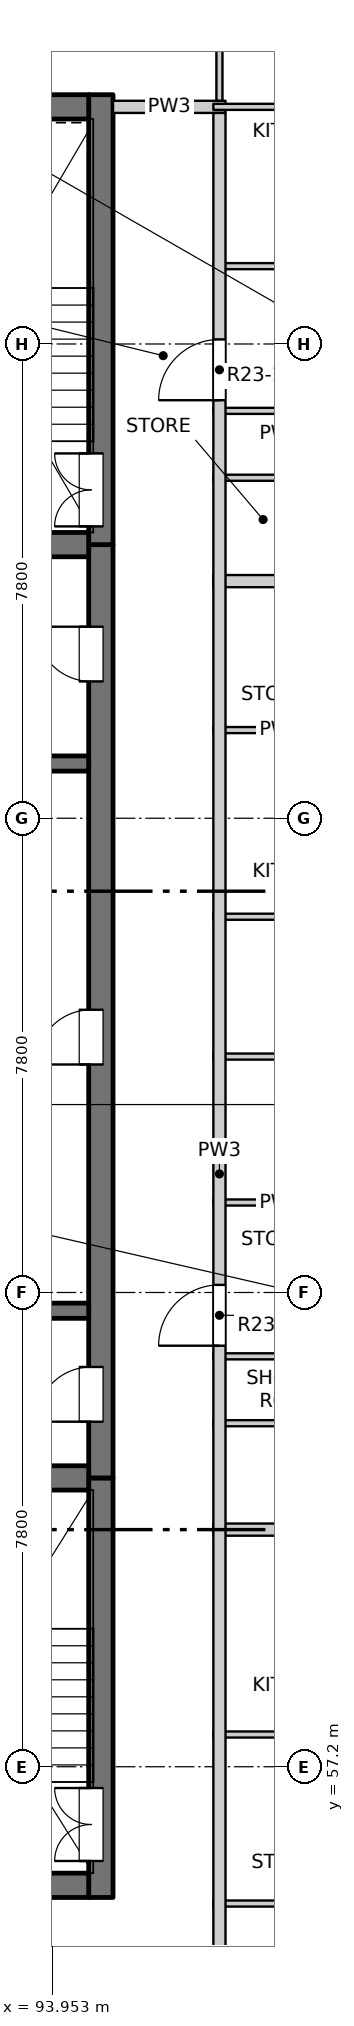
"""IFC4 building model, lengths in metres.
Left out: names, types, materials, properties, quantities, classifications, styles, units other than length and angle.
Written with IfcOpenShell. Run it as: python <this file> out.ifc"""

import sys

from ifc_helpers import new_model, si_unit, direction, frame, frame_2d, origin, place, context, subcontext, project, spatial, rectangle, extrude, element, fill, save


model = new_model("IFC4")
c1 = context("Model", 3, precision=1e-05, world=origin(), true_north=direction((0.0, 1.0)))
c2 = subcontext(c1, "Body", "Model", "MODEL_VIEW")
j1 = project(units=[si_unit("LENGTHUNIT", "METRE"), si_unit("PLANEANGLEUNIT", "RADIAN")], contexts=[c1])
p1 = place(None, origin())
s1 = spatial("IfcSite", under=j1, at=p1, CompositionType="ELEMENT")
p2 = place(p1, origin())
s2 = spatial("IfcBuilding", under=s1, at=p2, CompositionType="ELEMENT")
p3 = place(p2, frame((0.0, 0.0, 238.1)))
s3 = spatial("IfcBuildingStorey", under=s2, at=p3, CompositionType="ELEMENT", Elevation=238.1)
p4 = place(p3, frame((94.75, 55.05, -0.25), z_axis=(0.0, 0.0, 1.0), x_axis=(0.0, 1.0, 0.0)))
e1 = element("IfcWall", 1, at=p4, inside=s3, PredefinedType="SOLIDWALL", context=c2, shape_type="SweptSolid", body=[
    extrude(rectangle(XDim=6.9, YDim=0.4, at=frame_2d((3.45, 0.0))), origin(), (0.0, 0.0, 1.0), 3.35),
])
p5 = place(p4, frame((0.6, 0.0, 0.25)))
e2 = element("IfcOpeningElement", 2, at=p5, cuts=e1, PredefinedType="OPENING", context=c2, shape_type="SweptSolid", body=[
    extrude(rectangle(XDim=1.2, YDim=2.1, at=frame_2d((0.6, 1.05))), frame((0.0, 0.21, 0.0), z_axis=(0.0, -1.0, 0.0), x_axis=(1.0, 0.0, 0.0)), (0.0, 0.0, 1.0), 0.42),
])
p6 = place(p3, frame((94.75, 61.95, -0.25), z_axis=(0.0, 0.0, 1.0), x_axis=(0.0, 1.0, 0.0)))
e3 = element("IfcWall", 3, at=p6, inside=s3, PredefinedType="SOLIDWALL", context=c2, shape_type="SweptSolid", body=[
    extrude(rectangle(XDim=15.35, YDim=0.4, at=frame_2d((7.675, 0.0))), origin(), (0.0, 0.0, 1.0), 3.35),
])
p7 = place(p6, frame((0.925, 0.0, 0.25)))
e4 = element("IfcOpeningElement", 4, at=p7, cuts=e3, PredefinedType="OPENING", context=c2, shape_type="SweptSolid", body=[
    extrude(rectangle(XDim=0.9, YDim=2.1, at=frame_2d((0.45, 1.05))), frame((0.0, 0.21, 0.0), z_axis=(0.0, -1.0, 0.0), x_axis=(1.0, 0.0, 0.0)), (0.0, 0.0, 1.0), 0.42),
])
p8 = place(p6, frame((6.8, 0.0, 0.25)))
e5 = element("IfcOpeningElement", 5, at=p8, cuts=e3, PredefinedType="OPENING", context=c2, shape_type="SweptSolid", body=[
    extrude(rectangle(XDim=0.9, YDim=2.1, at=frame_2d((0.45, 1.05))), frame((0.0, 0.21, 0.0), z_axis=(0.0, -1.0, 0.0), x_axis=(1.0, 0.0, 0.0)), (0.0, 0.0, 1.0), 0.42),
])
p9 = place(p6, frame((13.1, 0.0, 0.25)))
e6 = element("IfcOpeningElement", 6, at=p9, cuts=e3, PredefinedType="OPENING", context=c2, shape_type="SweptSolid", body=[
    extrude(rectangle(XDim=0.9, YDim=2.1, at=frame_2d((0.45, 1.05))), frame((0.0, 0.21, 0.0), z_axis=(0.0, -1.0, 0.0), x_axis=(1.0, 0.0, 0.0)), (0.0, 0.0, 1.0), 0.42),
])
p10 = place(p3, frame((94.75, 77.3, -0.25), z_axis=(0.0, 0.0, 1.0), x_axis=(0.0, 1.0, 0.0)))
e7 = element("IfcWall", 7, at=p10, inside=s3, PredefinedType="SOLIDWALL", context=c2, shape_type="SweptSolid", body=[
    extrude(rectangle(XDim=7.4, YDim=0.4, at=frame_2d((3.7, 0.0))), origin(), (0.0, 0.0, 1.0), 3.35),
])
p11 = place(p10, frame((0.3, 0.0, 0.25)))
e8 = element("IfcOpeningElement", 8, at=p11, cuts=e7, PredefinedType="OPENING", context=c2, shape_type="SweptSolid", body=[
    extrude(rectangle(XDim=1.2, YDim=2.1, at=frame_2d((0.6, 1.05))), frame((0.0, 0.21, 0.0), z_axis=(0.0, -1.0, 0.0), x_axis=(1.0, 0.0, 0.0)), (0.0, 0.0, 1.0), 0.42),
])
p12 = place(p3, frame((75.45, 55.25, -0.25), z_axis=(0.0, 0.0, 1.0), x_axis=(1.0, 0.0, 0.0)))
e9 = element("IfcWall", 9, at=p12, inside=s3, PredefinedType="SOLIDWALL", context=c2, shape_type="SweptSolid", body=[
    extrude(rectangle(XDim=19.1, YDim=0.4, at=frame_2d((9.55, 0.0))), origin(), (0.0, 0.0, 1.0), 3.35),
])
p13 = place(p12, frame((8.8, 0.0, 0.25)))
e10 = element("IfcOpeningElement", 10, at=p13, cuts=e9, PredefinedType="OPENING", context=c2, shape_type="SweptSolid", body=[
    extrude(rectangle(XDim=1.5, YDim=2.1, at=frame_2d((0.75, 1.05))), frame((0.0, 0.21, 0.0), z_axis=(0.0, -1.0, 0.0), x_axis=(1.0, 0.0, 0.0)), (0.0, 0.0, 1.0), 0.42),
])
p14 = place(p3, frame((75.45, 84.5, -0.25), z_axis=(0.0, 0.0, 1.0), x_axis=(1.0, 0.0, 0.0)))
e11 = element("IfcWall", 11, at=p14, inside=s3, PredefinedType="SOLIDWALL", context=c2, shape_type="SweptSolid", body=[
    extrude(rectangle(XDim=19.1, YDim=0.4, at=frame_2d((9.55, 0.0))), origin(), (0.0, 0.0, 1.0), 3.35),
])
p15 = place(p3, frame((90.675, 61.95, -0.25), z_axis=(0.0, 0.0, 1.0), x_axis=(1.0, 0.0, 0.0)))
e12 = element("IfcWall", 12, at=p15, inside=s3, PredefinedType="SOLIDWALL", context=c2, shape_type="SweptSolid", body=[
    extrude(rectangle(XDim=3.875, YDim=0.4, at=frame_2d((1.938, 0.0))), origin(), (0.0, 0.0, 1.0), 3.35),
])
for number, where, z_axis, x_axis in (
    (13, (90.675, 64.7, -0.25), (0.0, 0.0, 1.0), (1.0, 0.0, 0.0)),
    (14, (90.675, 73.7, -0.25), (0.0, 0.0, 1.0), (1.0, 0.0, 0.0)),
):
    element("IfcWall", number, at=place(p3, frame(where, z_axis=z_axis, x_axis=x_axis)), inside=s3, PredefinedType="SOLIDWALL", context=c2, shape_type="SweptSolid", body=[
        extrude(rectangle(XDim=3.875, YDim=0.25, at=frame_2d((1.938, 0.0))), origin(), (0.0, 0.0, 1.0), 3.35),
    ])
p16 = place(p3, frame((90.675, 77.3, -0.25), z_axis=(0.0, 0.0, 1.0), x_axis=(1.0, 0.0, 0.0)))
e15 = element("IfcWall", 15, at=p16, inside=s3, PredefinedType="SOLIDWALL", context=c2, shape_type="SweptSolid", body=[
    extrude(rectangle(XDim=3.875, YDim=0.4, at=frame_2d((1.938, 0.0))), origin(), (0.0, 0.0, 1.0), 3.35),
])
for number, where, z_axis, x_axis in (
    (16, (96.6, 54.95, 0.0), (0.0, 0.0, 1.0), (1.0, 0.0, 0.0)),
    (17, (96.6, 57.73, 0.0), (0.0, 0.0, 1.0), (1.0, 0.0, 0.0)),
):
    element("IfcWall", number, at=place(p3, frame(where, z_axis=z_axis, x_axis=x_axis)), inside=s3, PredefinedType="PARTITIONING", context=c2, shape_type="SweptSolid", body=[
        extrude(rectangle(XDim=2.22, YDim=0.1, at=frame_2d((1.11, 0.0))), origin(), (0.0, 0.0, 1.0), 3.1),
    ])
p17 = place(p3, frame((96.6, 61.1, 0.0), z_axis=(0.0, 0.0, 1.0), x_axis=(1.0, 0.0, 0.0)))
e18 = element("IfcWall", 18, at=p17, inside=s3, PredefinedType="PARTITIONING", context=c2, shape_type="SweptSolid", body=[
    extrude(rectangle(XDim=11.5, YDim=0.2, at=frame_2d((5.75, 0.0))), origin(), (0.0, 0.0, 1.0), 3.1),
])
for number, where, z_axis, x_axis in (
    (19, (96.6, 62.85, 0.0), (0.0, 0.0, 1.0), (1.0, 0.0, 0.0)),
    (20, (96.6, 63.95, 0.0), (0.0, 0.0, 1.0), (1.0, 0.0, 0.0)),
    (21, (96.6, 66.48, 0.0), (0.0, 0.0, 1.0), (1.0, 0.0, 0.0)),
    (22, (96.6, 68.88, 0.0), (0.0, 0.0, 1.0), (1.0, 0.0, 0.0)),
    (23, (96.6, 71.18, 0.0), (0.0, 0.0, 1.0), (1.0, 0.0, 0.0)),
    (24, (96.6, 74.25, 0.0), (0.0, 0.0, 1.0), (1.0, 0.0, 0.0)),
):
    element("IfcWall", number, at=place(p3, frame(where, z_axis=z_axis, x_axis=x_axis)), inside=s3, PredefinedType="PARTITIONING", context=c2, shape_type="SweptSolid", body=[
        extrude(rectangle(XDim=2.22, YDim=0.1, at=frame_2d((1.11, 0.0))), origin(), (0.0, 0.0, 1.0), 3.1),
    ])
p18 = place(p3, frame((96.6, 76.7, 0.0), z_axis=(0.0, 0.0, 1.0), x_axis=(1.0, 0.0, 0.0)))
e25 = element("IfcWall", 25, at=p18, inside=s3, PredefinedType="PARTITIONING", context=c2, shape_type="SweptSolid", body=[
    extrude(rectangle(XDim=11.5, YDim=0.2, at=frame_2d((5.75, 0.0))), origin(), (0.0, 0.0, 1.0), 3.1),
])
for number, where, z_axis, x_axis in (
    (26, (96.6, 78.4, 0.0), (0.0, 0.0, 1.0), (1.0, 0.0, 0.0)),
    (27, (96.6, 79.5, 0.0), (0.0, 0.0, 1.0), (1.0, 0.0, 0.0)),
    (28, (96.6, 81.88, 0.0), (0.0, 0.0, 1.0), (1.0, 0.0, 0.0)),
):
    element("IfcWall", number, at=place(p3, frame(where, z_axis=z_axis, x_axis=x_axis)), inside=s3, PredefinedType="PARTITIONING", context=c2, shape_type="SweptSolid", body=[
        extrude(rectangle(XDim=2.22, YDim=0.1, at=frame_2d((1.11, 0.0))), origin(), (0.0, 0.0, 1.0), 3.1),
    ])
p19 = place(p3, frame((94.95, 84.5, 0.0), z_axis=(0.0, 0.0, 1.0), x_axis=(1.0, 0.0, 0.0)))
e29 = element("IfcWall", 29, at=p19, inside=s3, PredefinedType="PARTITIONING", context=c2, shape_type="SweptSolid", body=[
    extrude(rectangle(XDim=1.85, YDim=0.2, at=frame_2d((0.925, 0.0))), origin(), (0.0, 0.0, 1.0), 3.1),
])
p20 = place(p3, frame((96.6, 84.5, 0.0), z_axis=(0.0, 0.0, 1.0), x_axis=(1.0, 0.0, 0.0)))
e30 = element("IfcWall", 30, at=p20, inside=s3, PredefinedType="PARTITIONING", context=c2, shape_type="SweptSolid", body=[
    extrude(rectangle(XDim=11.5, YDim=0.1, at=frame_2d((5.75, 0.0))), origin(), (0.0, 0.0, 1.0), 3.1),
])
p21 = place(p20, frame((2.635, 0.0, 0.0)))
e31 = element("IfcOpeningElement", 31, at=p21, cuts=e30, PredefinedType="OPENING", context=c2, shape_type="SweptSolid", body=[
    extrude(rectangle(XDim=0.9, YDim=2.1, at=frame_2d((0.45, 1.05))), frame((0.0, 0.06, 0.0), z_axis=(0.0, -1.0, 0.0), x_axis=(1.0, 0.0, 0.0)), (0.0, 0.0, 1.0), 0.12),
])
p22 = place(p3, frame((96.7, 49.5, 0.0), z_axis=(0.0, 0.0, 1.0), x_axis=(0.0, 1.0, 0.0)))
e32 = element("IfcWall", 32, at=p22, inside=s3, PredefinedType="PARTITIONING", context=c2, shape_type="SweptSolid", body=[
    extrude(rectangle(XDim=34.9, YDim=0.2, at=frame_2d((17.45, 0.0))), origin(), (0.0, 0.0, 1.0), 3.1),
])
p23 = place(p22, frame((3.175, 0.0, 0.0)))
e33 = element("IfcOpeningElement", 33, at=p23, cuts=e32, PredefinedType="OPENING", context=c2, shape_type="SweptSolid", body=[
    extrude(rectangle(XDim=1.0, YDim=2.1, at=frame_2d((0.5, 1.05))), frame((0.0, 0.11, 0.0), z_axis=(0.0, -1.0, 0.0), x_axis=(1.0, 0.0, 0.0)), (0.0, 0.0, 1.0), 0.22),
])
p24 = place(p22, frame((14.625, 0.0, 0.0)))
e34 = element("IfcOpeningElement", 34, at=p24, cuts=e32, PredefinedType="OPENING", context=c2, shape_type="SweptSolid", body=[
    extrude(rectangle(XDim=1.0, YDim=2.1, at=frame_2d((0.5, 1.05))), frame((0.0, 0.11, 0.0), z_axis=(0.0, -1.0, 0.0), x_axis=(1.0, 0.0, 0.0)), (0.0, 0.0, 1.0), 0.22),
])
p25 = place(p22, frame((30.175, 0.0, 0.0)))
e35 = element("IfcOpeningElement", 35, at=p25, cuts=e32, PredefinedType="OPENING", context=c2, shape_type="SweptSolid", body=[
    extrude(rectangle(XDim=1.0, YDim=2.1, at=frame_2d((0.5, 1.05))), frame((0.0, 0.11, 0.0), z_axis=(0.0, -1.0, 0.0), x_axis=(1.0, 0.0, 0.0)), (0.0, 0.0, 1.0), 0.22),
])
p26 = place(p3, frame((96.7, 84.6, 0.0), z_axis=(0.0, 0.0, 1.0), x_axis=(0.0, 1.0, 0.0)))
e36 = element("IfcWall", 36, at=p26, inside=s3, PredefinedType="PARTITIONING", context=c2, shape_type="SweptSolid", body=[
    extrude(rectangle(XDim=3.5, YDim=0.1, at=frame_2d((1.75, 0.0))), origin(), (0.0, 0.0, 1.0), 3.1),
])
p27 = place(p26, frame((1.4, 0.0, 0.0)))
e37 = element("IfcOpeningElement", 37, at=p27, cuts=e36, PredefinedType="OPENING", context=c2, shape_type="SweptSolid", body=[
    extrude(rectangle(XDim=0.9, YDim=2.1, at=frame_2d((0.45, 1.05))), frame((0.0, 0.06, 0.0), z_axis=(0.0, -1.0, 0.0), x_axis=(1.0, 0.0, 0.0)), (0.0, 0.0, 1.0), 0.12),
])
p28 = place(p5, origin())
e38 = element("IfcDoor", 38, at=p28, inside=s3, OperationType="DOUBLE_DOOR_SINGLE_SWING", PredefinedType="DOOR", context=c2, shape_type="SweptSolid", body=[
    extrude(rectangle(XDim=1.2, YDim=2.1, at=frame_2d((0.6, 1.05))), frame((0.0, 0.185, 0.0), z_axis=(0.0, -1.0, 0.0), x_axis=(1.0, 0.0, 0.0)), (0.0, 0.0, 1.0), 0.05),
])
fill(e2, e38)
p29 = place(p7, origin())
e39 = element("IfcDoor", 39, at=p29, inside=s3, OperationType="SINGLE_SWING_LEFT", PredefinedType="DOOR", context=c2, shape_type="SweptSolid", body=[
    extrude(rectangle(XDim=0.9, YDim=2.1, at=frame_2d((0.45, 1.05))), frame((0.0, 0.185, 0.0), z_axis=(0.0, -1.0, 0.0), x_axis=(1.0, 0.0, 0.0)), (0.0, 0.0, 1.0), 0.05),
])
fill(e4, e39)
p30 = place(p24, origin())
e40 = element("IfcDoor", 40, at=p30, inside=s3, OperationType="SINGLE_SWING_LEFT", PredefinedType="DOOR", context=c2, shape_type="SweptSolid", body=[
    extrude(rectangle(XDim=1.0, YDim=2.1, at=frame_2d((0.5, 1.05))), frame((0.0, 0.025, 0.0), z_axis=(0.0, -1.0, 0.0), x_axis=(1.0, 0.0, 0.0)), (0.0, 0.0, 1.0), 0.05),
])
fill(e34, e40)
p31 = place(p8, origin())
e41 = element("IfcDoor", 41, at=p31, inside=s3, OperationType="SINGLE_SWING_LEFT", PredefinedType="DOOR", context=c2, shape_type="SweptSolid", body=[
    extrude(rectangle(XDim=0.9, YDim=2.1, at=frame_2d((0.45, 1.05))), frame((0.0, 0.185, 0.0), z_axis=(0.0, -1.0, 0.0), x_axis=(1.0, 0.0, 0.0)), (0.0, 0.0, 1.0), 0.05),
])
fill(e5, e41)
p32 = place(p9, origin())
e42 = element("IfcDoor", 42, at=p32, inside=s3, OperationType="SINGLE_SWING_RIGHT", PredefinedType="DOOR", context=c2, shape_type="SweptSolid", body=[
    extrude(rectangle(XDim=0.9, YDim=2.1, at=frame_2d((0.45, 1.05))), frame((0.0, 0.185, 0.0), z_axis=(0.0, -1.0, 0.0), x_axis=(1.0, 0.0, 0.0)), (0.0, 0.0, 1.0), 0.05),
])
fill(e6, e42)
p33 = place(p11, origin())
e43 = element("IfcDoor", 43, at=p33, inside=s3, OperationType="DOUBLE_DOOR_SINGLE_SWING", PredefinedType="DOOR", context=c2, shape_type="SweptSolid", body=[
    extrude(rectangle(XDim=1.2, YDim=2.1, at=frame_2d((0.6, 1.05))), frame((0.0, 0.185, 0.0), z_axis=(0.0, -1.0, 0.0), x_axis=(1.0, 0.0, 0.0)), (0.0, 0.0, 1.0), 0.05),
])
fill(e8, e43)
p34 = place(p25, origin())
e44 = element("IfcDoor", 44, at=p34, inside=s3, OperationType="SINGLE_SWING_LEFT", PredefinedType="DOOR", context=c2, shape_type="SweptSolid", body=[
    extrude(rectangle(XDim=1.0, YDim=2.1, at=frame_2d((0.5, 1.05))), frame((0.0, 0.025, 0.0), z_axis=(0.0, -1.0, 0.0), x_axis=(1.0, 0.0, 0.0)), (0.0, 0.0, 1.0), 0.05),
])
fill(e35, e44)
save(model, sys.argv[1])
